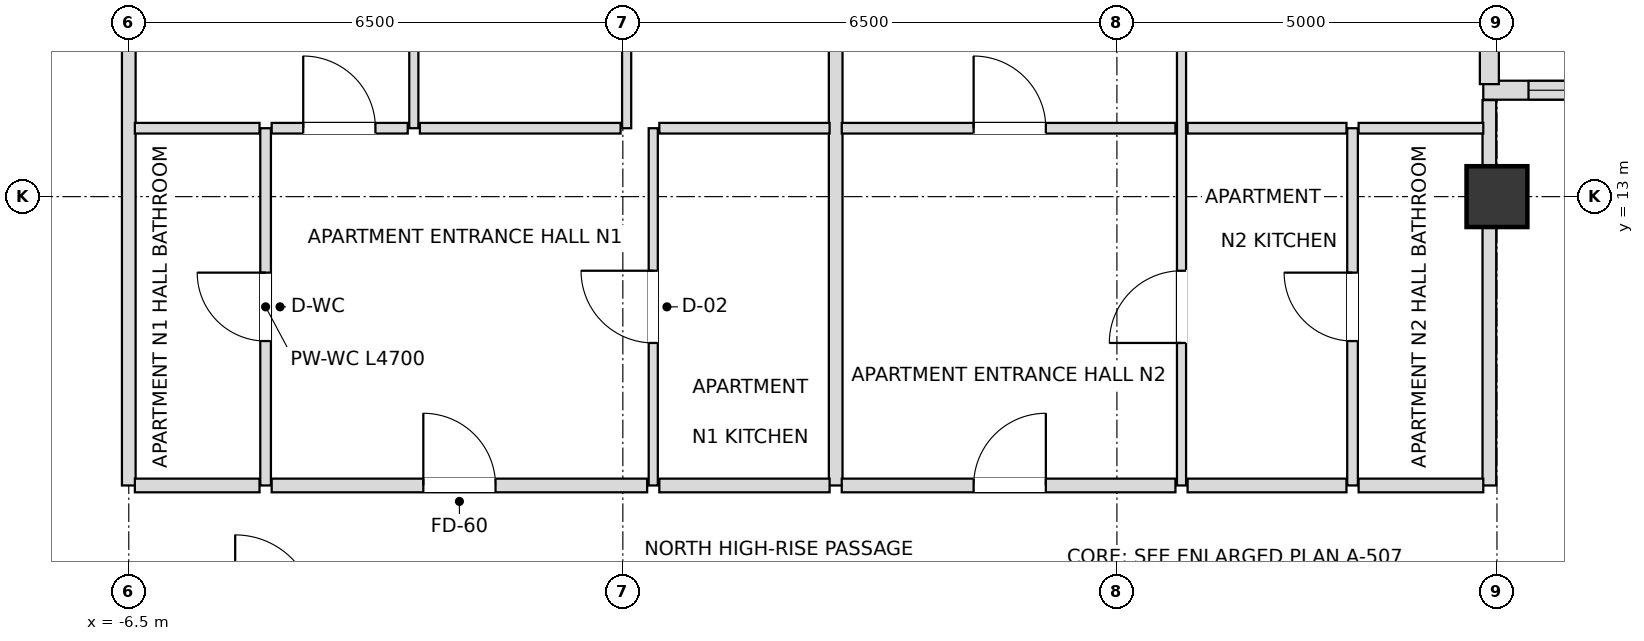
"""IFC4 building model, lengths in metres.
Left out: names, types, materials, properties, quantities, classifications, styles, units other than length and angle.
Written with IfcOpenShell. Run it as: python <this file> out.ifc"""

import sys

from ifc_helpers import new_model, si_unit, direction, frame, frame_2d, origin, origin_2d, place, context, subcontext, project, spatial, rectangle, extrude, element, fill, save


model = new_model("IFC4")
c1 = context("Model", 3, precision=1e-05, world=origin(), true_north=direction((0.0, 1.0)))
c2 = subcontext(c1, "Body", "Model", "MODEL_VIEW")
j1 = project(units=[si_unit("LENGTHUNIT", "METRE"), si_unit("PLANEANGLEUNIT", "RADIAN")], contexts=[c1])
p1 = place(None, origin())
s1 = spatial("IfcSite", under=j1, at=p1, CompositionType="ELEMENT")
p2 = place(p1, origin())
s2 = spatial("IfcBuilding", under=s1, at=p2, CompositionType="ELEMENT")
p3 = place(p2, frame((0.0, 0.0, 240.3)))
s3 = spatial("IfcBuildingStorey", under=s2, at=p3, CompositionType="ELEMENT", Elevation=240.3)
p4 = place(p3, frame((11.5, 13.0, 0.0), z_axis=(0.0, 0.0, 1.0), x_axis=(1.0, 0.0, 0.0)))
e1 = element("IfcColumn", 1, at=p4, inside=s3, PredefinedType="COLUMN", context=c2, shape_type="SweptSolid", body=[
    extrude(rectangle(XDim=0.8, YDim=0.8, at=origin_2d()), origin(), (0.0, 0.0, 1.0), 3.6),
])
p5 = place(p3, frame((16.98, 14.4, 0.0), z_axis=(0.0, 0.0, 1.0), x_axis=(-1.0, 0.0, 0.0)))
e2 = element("IfcWall", 2, at=p5, inside=s3, PredefinedType="SOLIDWALL", context=c2, shape_type="SweptSolid", body=[
    extrude(rectangle(XDim=5.66, YDim=0.25, at=frame_2d((2.83, 0.0))), origin(), (0.0, 0.0, 1.0), 2.748),
])
p6 = place(p5, frame((0.595, 0.0, 0.72)))
e3 = element("IfcOpeningElement", 3, at=p6, cuts=e2, PredefinedType="OPENING", context=c2, shape_type="SweptSolid", body=[
    extrude(rectangle(XDim=1.8, YDim=1.68, at=frame_2d((0.9, 0.84))), frame((0.0, 0.135, 0.0), z_axis=(0.0, -1.0, 0.0), x_axis=(1.0, 0.0, 0.0)), (0.0, 0.0, 1.0), 0.27),
])
p7 = place(p5, frame((3.265, 0.0, 0.72)))
e4 = element("IfcOpeningElement", 4, at=p7, cuts=e2, PredefinedType="OPENING", context=c2, shape_type="SweptSolid", body=[
    extrude(rectangle(XDim=1.8, YDim=1.68, at=frame_2d((0.9, 0.84))), frame((0.0, 0.135, 0.0), z_axis=(0.0, -1.0, 0.0), x_axis=(1.0, 0.0, 0.0)), (0.0, 0.0, 1.0), 0.27),
])
p8 = place(p3, frame((11.4, 14.48, 0.0), z_axis=(0.0, 0.0, 1.0), x_axis=(0.0, 1.0, 0.0)))
e5 = element("IfcWall", 5, at=p8, inside=s3, PredefinedType="SOLIDWALL", context=c2, shape_type="SweptSolid", body=[
    extrude(rectangle(XDim=5.34, YDim=0.25, at=frame_2d((2.67, 0.0))), origin(), (0.0, 0.0, 1.0), 2.748),
])
p9 = place(p8, frame((1.615, 0.0, 0.72)))
e6 = element("IfcOpeningElement", 6, at=p9, cuts=e5, PredefinedType="OPENING", context=c2, shape_type="SweptSolid", body=[
    extrude(rectangle(XDim=1.8, YDim=1.68, at=frame_2d((0.9, 0.84))), frame((0.0, 0.135, 0.0), z_axis=(0.0, -1.0, 0.0), x_axis=(1.0, 0.0, 0.0)), (0.0, 0.0, 1.0), 0.27),
])
p10 = place(p3, frame((-6.5, 9.2, 0.0), z_axis=(0.0, 0.0, 1.0), x_axis=(0.0, 1.0, 0.0)))
e7 = element("IfcWall", 7, at=p10, inside=s3, PredefinedType="PARTITIONING", context=c2, shape_type="SweptSolid", body=[
    extrude(rectangle(XDim=10.7, YDim=0.18, at=frame_2d((5.35, 0.0))), origin(), (0.0, 0.0, 1.0), 2.826),
])
p11 = place(p3, frame((-4.7, 9.2, 0.0), z_axis=(0.0, 0.0, 1.0), x_axis=(0.0, 1.0, 0.0)))
e8 = element("IfcWall", 8, at=p11, inside=s3, PredefinedType="PARTITIONING", context=c2, shape_type="SweptSolid", body=[
    extrude(rectangle(XDim=4.7, YDim=0.14, at=frame_2d((2.35, 0.0))), origin(), (0.0, 0.0, 1.0), 3.38),
])
p12 = place(p11, frame((1.9, 0.0, 0.0)))
e9 = element("IfcOpeningElement", 9, at=p12, cuts=e8, PredefinedType="OPENING", context=c2, shape_type="SweptSolid", body=[
    extrude(rectangle(XDim=0.9, YDim=2.1, at=frame_2d((0.45, 1.05))), frame((0.0, 0.08, 0.0), z_axis=(0.0, -1.0, 0.0), x_axis=(1.0, 0.0, 0.0)), (0.0, 0.0, 1.0), 0.16),
])
p13 = place(p3, frame((-2.75, 13.9, 0.0), z_axis=(0.0, 0.0, 1.0), x_axis=(0.0, 1.0, 0.0)))
e10 = element("IfcWall", 10, at=p13, inside=s3, PredefinedType="PARTITIONING", context=c2, shape_type="SweptSolid", body=[
    extrude(rectangle(XDim=6.0, YDim=0.12, at=frame_2d((3.0, 0.0))), origin(), (0.0, 0.0, 1.0), 3.018),
])
p14 = place(p13, frame((2.55, 0.0, 0.0)))
e11 = element("IfcOpeningElement", 11, at=p14, cuts=e10, PredefinedType="OPENING", context=c2, shape_type="SweptSolid", body=[
    extrude(rectangle(XDim=0.9, YDim=2.1, at=frame_2d((0.45, 1.05))), frame((0.0, 0.07, 0.0), z_axis=(0.0, -1.0, 0.0), x_axis=(1.0, 0.0, 0.0)), (0.0, 0.0, 1.0), 0.14),
])
p15 = place(p3, frame((0.05, 13.9, 0.0), z_axis=(0.0, 0.0, 1.0), x_axis=(0.0, 1.0, 0.0)))
e12 = element("IfcWall", 12, at=p15, inside=s3, PredefinedType="PARTITIONING", context=c2, shape_type="SweptSolid", body=[
    extrude(rectangle(XDim=6.0, YDim=0.12, at=frame_2d((3.0, 0.0))), origin(), (0.0, 0.0, 1.0), 3.018),
])
p16 = place(p15, frame((2.55, 0.0, 0.0)))
e13 = element("IfcOpeningElement", 13, at=p16, cuts=e12, PredefinedType="OPENING", context=c2, shape_type="SweptSolid", body=[
    extrude(rectangle(XDim=0.9, YDim=2.1, at=frame_2d((0.45, 1.05))), frame((0.0, 0.07, 0.0), z_axis=(0.0, -1.0, 0.0), x_axis=(1.0, 0.0, 0.0)), (0.0, 0.0, 1.0), 0.14),
])
p17 = place(p3, frame((0.4, 9.2, 0.0), z_axis=(0.0, 0.0, 1.0), x_axis=(0.0, 1.0, 0.0)))
e14 = element("IfcWall", 14, at=p17, inside=s3, PredefinedType="PARTITIONING", context=c2, shape_type="SweptSolid", body=[
    extrude(rectangle(XDim=4.7, YDim=0.12, at=frame_2d((2.35, 0.0))), origin(), (0.0, 0.0, 1.0), 3.38),
])
p18 = place(p17, frame((1.875, 0.0, 0.0)))
e15 = element("IfcOpeningElement", 15, at=p18, cuts=e14, PredefinedType="OPENING", context=c2, shape_type="SweptSolid", body=[
    extrude(rectangle(XDim=0.95, YDim=2.1, at=frame_2d((0.475, 1.05))), frame((0.0, 0.07, 0.0), z_axis=(0.0, -1.0, 0.0), x_axis=(1.0, 0.0, 0.0)), (0.0, 0.0, 1.0), 0.14),
])
p19 = place(p3, frame((2.8, 9.2, 0.0), z_axis=(0.0, 0.0, 1.0), x_axis=(0.0, 1.0, 0.0)))
e16 = element("IfcWall", 16, at=p19, inside=s3, PredefinedType="PARTITIONING", context=c2, shape_type="SweptSolid", body=[
    extrude(rectangle(XDim=10.7, YDim=0.18, at=frame_2d((5.35, 0.0))), origin(), (0.0, 0.0, 1.0), 3.018),
])
p20 = place(p3, frame((7.35, 9.2, 0.0), z_axis=(0.0, 0.0, 1.0), x_axis=(0.0, 1.0, 0.0)))
e17 = element("IfcWall", 17, at=p20, inside=s3, PredefinedType="PARTITIONING", context=c2, shape_type="SweptSolid", body=[
    extrude(rectangle(XDim=10.7, YDim=0.12, at=frame_2d((5.35, 0.0))), origin(), (0.0, 0.0, 1.0), 2.826),
])
p21 = place(p20, frame((1.875, 0.0, 0.0)))
e18 = element("IfcOpeningElement", 18, at=p21, cuts=e17, PredefinedType="OPENING", context=c2, shape_type="SweptSolid", body=[
    extrude(rectangle(XDim=0.95, YDim=2.1, at=frame_2d((0.475, 1.05))), frame((0.0, 0.07, 0.0), z_axis=(0.0, -1.0, 0.0), x_axis=(1.0, 0.0, 0.0)), (0.0, 0.0, 1.0), 0.14),
])
p22 = place(p20, frame((7.25, 0.0, 0.0)))
e19 = element("IfcOpeningElement", 19, at=p22, cuts=e17, PredefinedType="OPENING", context=c2, shape_type="SweptSolid", body=[
    extrude(rectangle(XDim=0.9, YDim=2.1, at=frame_2d((0.45, 1.05))), frame((0.0, 0.07, 0.0), z_axis=(0.0, -1.0, 0.0), x_axis=(1.0, 0.0, 0.0)), (0.0, 0.0, 1.0), 0.14),
])
p23 = place(p3, frame((9.6, 9.2, 0.0), z_axis=(0.0, 0.0, 1.0), x_axis=(0.0, 1.0, 0.0)))
e20 = element("IfcWall", 20, at=p23, inside=s3, PredefinedType="PARTITIONING", context=c2, shape_type="SweptSolid", body=[
    extrude(rectangle(XDim=4.7, YDim=0.14, at=frame_2d((2.35, 0.0))), origin(), (0.0, 0.0, 1.0), 2.826),
])
p24 = place(p23, frame((1.9, 0.0, 0.0)))
e21 = element("IfcOpeningElement", 21, at=p24, cuts=e20, PredefinedType="OPENING", context=c2, shape_type="SweptSolid", body=[
    extrude(rectangle(XDim=0.9, YDim=2.1, at=frame_2d((0.45, 1.05))), frame((0.0, 0.08, 0.0), z_axis=(0.0, -1.0, 0.0), x_axis=(1.0, 0.0, 0.0)), (0.0, 0.0, 1.0), 0.16),
])
p25 = place(p3, frame((11.4, 9.2, 0.0), z_axis=(0.0, 0.0, 1.0), x_axis=(0.0, 1.0, 0.0)))
e22 = element("IfcWall", 22, at=p25, inside=s3, PredefinedType="PARTITIONING", context=c2, shape_type="SweptSolid", body=[
    extrude(rectangle(XDim=5.07, YDim=0.18, at=frame_2d((2.535, 0.0))), origin(), (0.0, 0.0, 1.0), 2.748),
])
p26 = place(p3, frame((-6.42, 9.2, 0.0), z_axis=(0.0, 0.0, 1.0), x_axis=(1.0, 0.0, 0.0)))
e23 = element("IfcWall", 23, at=p26, inside=s3, PredefinedType="PARTITIONING", context=c2, shape_type="SweptSolid", body=[
    extrude(rectangle(XDim=1.64, YDim=0.18, at=frame_2d((0.82, 0.0))), origin(), (0.0, 0.0, 1.0), 3.38),
])
p27 = place(p3, frame((-4.62, 9.2, 0.0), z_axis=(0.0, 0.0, 1.0), x_axis=(1.0, 0.0, 0.0)))
e24 = element("IfcWall", 24, at=p27, inside=s3, PredefinedType="PARTITIONING", context=c2, shape_type="SweptSolid", body=[
    extrude(rectangle(XDim=4.94, YDim=0.18, at=frame_2d((2.47, 0.0))), origin(), (0.0, 0.0, 1.0), 3.38),
])
p28 = place(p27, frame((1.995, 0.0, 0.0)))
e25 = element("IfcOpeningElement", 25, at=p28, cuts=e24, PredefinedType="OPENING", context=c2, shape_type="SweptSolid", body=[
    extrude(rectangle(XDim=0.95, YDim=2.15, at=frame_2d((0.475, 1.075))), frame((0.0, 0.1, 0.0), z_axis=(0.0, -1.0, 0.0), x_axis=(1.0, 0.0, 0.0)), (0.0, 0.0, 1.0), 0.2),
])
p29 = place(p3, frame((0.48, 9.2, 0.0), z_axis=(0.0, 0.0, 1.0), x_axis=(1.0, 0.0, 0.0)))
e26 = element("IfcWall", 26, at=p29, inside=s3, PredefinedType="PARTITIONING", context=c2, shape_type="SweptSolid", body=[
    extrude(rectangle(XDim=2.24, YDim=0.18, at=frame_2d((1.12, 0.0))), origin(), (0.0, 0.0, 1.0), 3.38),
])
p30 = place(p3, frame((2.88, 9.2, 0.0), z_axis=(0.0, 0.0, 1.0), x_axis=(1.0, 0.0, 0.0)))
e27 = element("IfcWall", 27, at=p30, inside=s3, PredefinedType="PARTITIONING", context=c2, shape_type="SweptSolid", body=[
    extrude(rectangle(XDim=4.39, YDim=0.18, at=frame_2d((2.195, 0.0))), origin(), (0.0, 0.0, 1.0), 2.826),
])
p31 = place(p30, frame((1.735, 0.0, 0.0)))
e28 = element("IfcOpeningElement", 28, at=p31, cuts=e27, PredefinedType="OPENING", context=c2, shape_type="SweptSolid", body=[
    extrude(rectangle(XDim=0.95, YDim=2.15, at=frame_2d((0.475, 1.075))), frame((0.0, 0.1, 0.0), z_axis=(0.0, -1.0, 0.0), x_axis=(1.0, 0.0, 0.0)), (0.0, 0.0, 1.0), 0.2),
])
p32 = place(p3, frame((7.43, 9.2, 0.0), z_axis=(0.0, 0.0, 1.0), x_axis=(1.0, 0.0, 0.0)))
e29 = element("IfcWall", 29, at=p32, inside=s3, PredefinedType="PARTITIONING", context=c2, shape_type="SweptSolid", body=[
    extrude(rectangle(XDim=2.09, YDim=0.18, at=frame_2d((1.045, 0.0))), origin(), (0.0, 0.0, 1.0), 3.38),
])
p33 = place(p3, frame((9.68, 9.2, 0.0), z_axis=(0.0, 0.0, 1.0), x_axis=(1.0, 0.0, 0.0)))
e30 = element("IfcWall", 30, at=p33, inside=s3, PredefinedType="PARTITIONING", context=c2, shape_type="SweptSolid", body=[
    extrude(rectangle(XDim=1.64, YDim=0.18, at=frame_2d((0.82, 0.0))), origin(), (0.0, 0.0, 1.0), 3.38),
])
p34 = place(p3, frame((-6.42, 13.9, 0.0), z_axis=(0.0, 0.0, 1.0), x_axis=(1.0, 0.0, 0.0)))
e31 = element("IfcWall", 31, at=p34, inside=s3, PredefinedType="PARTITIONING", context=c2, shape_type="SweptSolid", body=[
    extrude(rectangle(XDim=1.64, YDim=0.14, at=frame_2d((0.82, 0.0))), origin(), (0.0, 0.0, 1.0), 3.38),
])
p35 = place(p3, frame((-4.62, 13.9, 0.0), z_axis=(0.0, 0.0, 1.0), x_axis=(1.0, 0.0, 0.0)))
e32 = element("IfcWall", 32, at=p35, inside=s3, PredefinedType="PARTITIONING", context=c2, shape_type="SweptSolid", body=[
    extrude(rectangle(XDim=1.79, YDim=0.14, at=frame_2d((0.895, 0.0))), origin(), (0.0, 0.0, 1.0), 3.38),
])
p36 = place(p35, frame((0.415, 0.0, 0.0)))
e33 = element("IfcOpeningElement", 33, at=p36, cuts=e32, PredefinedType="OPENING", context=c2, shape_type="SweptSolid", body=[
    extrude(rectangle(XDim=0.95, YDim=2.1, at=frame_2d((0.475, 1.05))), frame((0.0, 0.08, 0.0), z_axis=(0.0, -1.0, 0.0), x_axis=(1.0, 0.0, 0.0)), (0.0, 0.0, 1.0), 0.16),
])
p37 = place(p3, frame((-2.67, 13.9, 0.0), z_axis=(0.0, 0.0, 1.0), x_axis=(1.0, 0.0, 0.0)))
e34 = element("IfcWall", 34, at=p37, inside=s3, PredefinedType="PARTITIONING", context=c2, shape_type="SweptSolid", body=[
    extrude(rectangle(XDim=2.64, YDim=0.14, at=frame_2d((1.32, 0.0))), origin(), (0.0, 0.0, 1.0), 3.38),
])
p38 = place(p3, frame((0.48, 13.9, 0.0), z_axis=(0.0, 0.0, 1.0), x_axis=(1.0, 0.0, 0.0)))
e35 = element("IfcWall", 35, at=p38, inside=s3, PredefinedType="PARTITIONING", context=c2, shape_type="SweptSolid", body=[
    extrude(rectangle(XDim=2.24, YDim=0.14, at=frame_2d((1.12, 0.0))), origin(), (0.0, 0.0, 1.0), 3.38),
])
p39 = place(p3, frame((2.88, 13.9, 0.0), z_axis=(0.0, 0.0, 1.0), x_axis=(1.0, 0.0, 0.0)))
e36 = element("IfcWall", 36, at=p39, inside=s3, PredefinedType="PARTITIONING", context=c2, shape_type="SweptSolid", body=[
    extrude(rectangle(XDim=4.39, YDim=0.14, at=frame_2d((2.195, 0.0))), origin(), (0.0, 0.0, 1.0), 2.826),
])
p40 = place(p39, frame((1.735, 0.0, 0.0)))
e37 = element("IfcOpeningElement", 37, at=p40, cuts=e36, PredefinedType="OPENING", context=c2, shape_type="SweptSolid", body=[
    extrude(rectangle(XDim=0.95, YDim=2.1, at=frame_2d((0.475, 1.05))), frame((0.0, 0.08, 0.0), z_axis=(0.0, -1.0, 0.0), x_axis=(1.0, 0.0, 0.0)), (0.0, 0.0, 1.0), 0.16),
])
p41 = place(p3, frame((7.43, 13.9, 0.0), z_axis=(0.0, 0.0, 1.0), x_axis=(1.0, 0.0, 0.0)))
e38 = element("IfcWall", 38, at=p41, inside=s3, PredefinedType="PARTITIONING", context=c2, shape_type="SweptSolid", body=[
    extrude(rectangle(XDim=2.09, YDim=0.14, at=frame_2d((1.045, 0.0))), origin(), (0.0, 0.0, 1.0), 3.38),
])
p42 = place(p3, frame((9.68, 13.9, 0.0), z_axis=(0.0, 0.0, 1.0), x_axis=(1.0, 0.0, 0.0)))
e39 = element("IfcWall", 39, at=p42, inside=s3, PredefinedType="PARTITIONING", context=c2, shape_type="SweptSolid", body=[
    extrude(rectangle(XDim=1.64, YDim=0.14, at=frame_2d((0.82, 0.0))), origin(), (0.0, 0.0, 1.0), 3.38),
])
p43 = place(p7, origin())
e40 = element("IfcWindow", 40, at=p43, inside=s3, PartitioningType="SINGLE_PANEL", PredefinedType="WINDOW", context=c2, shape_type="SweptSolid", body=[
    extrude(rectangle(XDim=1.8, YDim=1.68, at=frame_2d((0.9, 0.84))), frame((0.0, 0.03, 0.0), z_axis=(0.0, -1.0, 0.0), x_axis=(1.0, 0.0, 0.0)), (0.0, 0.0, 1.0), 0.06),
])
fill(e4, e40)
p44 = place(p12, origin())
e41 = element("IfcDoor", 41, at=p44, inside=s3, OperationType="SINGLE_SWING_RIGHT", PredefinedType="DOOR", context=c2, shape_type="SweptSolid", body=[
    extrude(rectangle(XDim=0.9, YDim=2.1, at=frame_2d((0.45, 1.05))), frame((0.0, 0.025, 0.0), z_axis=(0.0, -1.0, 0.0), x_axis=(1.0, 0.0, 0.0)), (0.0, 0.0, 1.0), 0.05),
])
fill(e9, e41)
p45 = place(p28, origin())
e42 = element("IfcDoor", 42, at=p45, inside=s3, OperationType="SINGLE_SWING_LEFT", PredefinedType="DOOR", context=c2, shape_type="SweptSolid", body=[
    extrude(rectangle(XDim=0.95, YDim=2.15, at=frame_2d((0.475, 1.075))), frame((0.0, 0.025, 0.0), z_axis=(0.0, -1.0, 0.0), x_axis=(1.0, 0.0, 0.0)), (0.0, 0.0, 1.0), 0.05),
])
fill(e25, e42)
p46 = place(p18, origin())
e43 = element("IfcDoor", 43, at=p46, inside=s3, OperationType="SINGLE_SWING_RIGHT", PredefinedType="DOOR", context=c2, shape_type="SweptSolid", body=[
    extrude(rectangle(XDim=0.95, YDim=2.1, at=frame_2d((0.475, 1.05))), frame((0.0, 0.025, 0.0), z_axis=(0.0, -1.0, 0.0), x_axis=(1.0, 0.0, 0.0)), (0.0, 0.0, 1.0), 0.05),
])
fill(e15, e43)
p47 = place(p36, origin())
e44 = element("IfcDoor", 44, at=p47, inside=s3, OperationType="SINGLE_SWING_LEFT", PredefinedType="DOOR", context=c2, shape_type="SweptSolid", body=[
    extrude(rectangle(XDim=0.95, YDim=2.1, at=frame_2d((0.475, 1.05))), frame((0.0, 0.025, 0.0), z_axis=(0.0, -1.0, 0.0), x_axis=(1.0, 0.0, 0.0)), (0.0, 0.0, 1.0), 0.05),
])
fill(e33, e44)
p48 = place(p31, origin())
e45 = element("IfcDoor", 45, at=p48, inside=s3, OperationType="SINGLE_SWING_RIGHT", PredefinedType="DOOR", context=c2, shape_type="SweptSolid", body=[
    extrude(rectangle(XDim=0.95, YDim=2.15, at=frame_2d((0.475, 1.075))), frame((0.0, 0.025, 0.0), z_axis=(0.0, -1.0, 0.0), x_axis=(1.0, 0.0, 0.0)), (0.0, 0.0, 1.0), 0.05),
])
fill(e28, e45)
p49 = place(p21, origin())
e46 = element("IfcDoor", 46, at=p49, inside=s3, OperationType="SINGLE_SWING_LEFT", PredefinedType="DOOR", context=c2, shape_type="SweptSolid", body=[
    extrude(rectangle(XDim=0.95, YDim=2.1, at=frame_2d((0.475, 1.05))), frame((0.0, 0.025, 0.0), z_axis=(0.0, -1.0, 0.0), x_axis=(1.0, 0.0, 0.0)), (0.0, 0.0, 1.0), 0.05),
])
fill(e18, e46)
p50 = place(p24, origin())
e47 = element("IfcDoor", 47, at=p50, inside=s3, OperationType="SINGLE_SWING_RIGHT", PredefinedType="DOOR", context=c2, shape_type="SweptSolid", body=[
    extrude(rectangle(XDim=0.9, YDim=2.1, at=frame_2d((0.45, 1.05))), frame((0.0, 0.025, 0.0), z_axis=(0.0, -1.0, 0.0), x_axis=(1.0, 0.0, 0.0)), (0.0, 0.0, 1.0), 0.05),
])
fill(e21, e47)
p51 = place(p40, origin())
e48 = element("IfcDoor", 48, at=p51, inside=s3, OperationType="SINGLE_SWING_LEFT", PredefinedType="DOOR", context=c2, shape_type="SweptSolid", body=[
    extrude(rectangle(XDim=0.95, YDim=2.1, at=frame_2d((0.475, 1.05))), frame((0.0, 0.025, 0.0), z_axis=(0.0, -1.0, 0.0), x_axis=(1.0, 0.0, 0.0)), (0.0, 0.0, 1.0), 0.05),
])
fill(e37, e48)
save(model, sys.argv[1])
